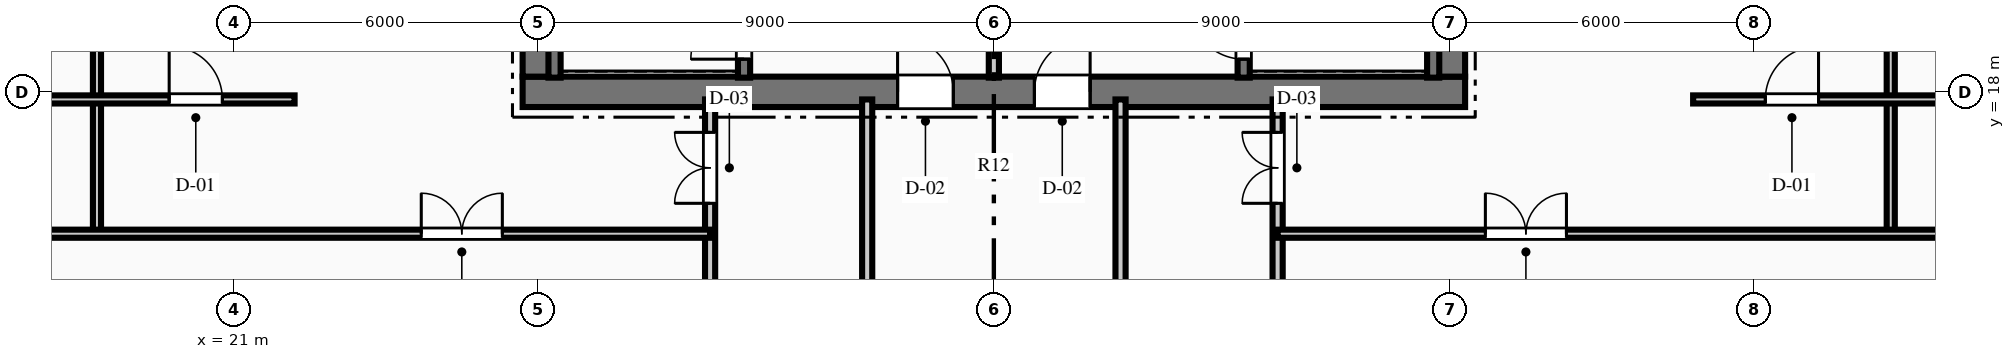
"""IFC4 building model, lengths in metres.
Left out: names, types, materials, properties, quantities, classifications, styles, units other than length and angle.
Written with IfcOpenShell. Run it as: python <this file> out.ifc"""

import sys

from ifc_helpers import new_model, si_unit, direction, frame, frame_2d, origin, place, context, subcontext, project, spatial, rectangle, extrude, element, fill, save


model = new_model("IFC4")
c1 = context("Model", 3, precision=1e-05, world=origin(), true_north=direction((0.0, 1.0)))
c2 = subcontext(c1, "Body", "Model", "MODEL_VIEW")
j1 = project(units=[si_unit("LENGTHUNIT", "METRE"), si_unit("PLANEANGLEUNIT", "RADIAN")], contexts=[c1])
p1 = place(None, origin())
s1 = spatial("IfcSite", under=j1, at=p1, CompositionType="ELEMENT")
p2 = place(p1, origin())
s2 = spatial("IfcBuilding", under=s1, at=p2, CompositionType="ELEMENT")
p3 = place(p2, origin())
s3 = spatial("IfcBuildingStorey", under=s2, at=p3, CompositionType="ELEMENT", Elevation=0.0)
p4 = place(p3, frame((26.7, 18.0, 0.0), z_axis=(0.0, 0.0, 1.0), x_axis=(1.0, 0.0, 0.0)))
e1 = element("IfcWall", 1, at=p4, inside=s3, PredefinedType="SHEAR", context=c2, shape_type="SweptSolid", body=[
    extrude(rectangle(XDim=18.6, YDim=0.6, at=frame_2d((9.3, 0.0))), origin(), (0.0, 0.0, 1.0), 6.0),
])
p5 = place(p4, frame((7.4, 0.0, 0.0)))
e2 = element("IfcOpeningElement", 2, at=p5, cuts=e1, PredefinedType="OPENING", context=c2, shape_type="SweptSolid", body=[
    extrude(rectangle(XDim=1.1, YDim=2.15, at=frame_2d((0.55, 1.075))), frame((0.0, 0.31, 0.0), z_axis=(0.0, -1.0, 0.0), x_axis=(1.0, 0.0, 0.0)), (0.0, 0.0, 1.0), 0.62),
])
p6 = place(p4, frame((10.1, 0.0, 0.0)))
e3 = element("IfcOpeningElement", 3, at=p6, cuts=e1, PredefinedType="OPENING", context=c2, shape_type="SweptSolid", body=[
    extrude(rectangle(XDim=1.1, YDim=2.15, at=frame_2d((0.55, 1.075))), frame((0.0, 0.31, 0.0), z_axis=(0.0, -1.0, 0.0), x_axis=(1.0, 0.0, 0.0)), (0.0, 0.0, 1.0), 0.62),
])
p7 = place(p3, frame((27.0, 18.3, 0.0), z_axis=(0.0, 0.0, 1.0), x_axis=(0.0, 1.0, 0.0)))
e4 = element("IfcWall", 4, at=p7, inside=s3, PredefinedType="SHEAR", context=c2, shape_type="SweptSolid", body=[
    extrude(rectangle(XDim=15.4, YDim=0.6, at=frame_2d((7.7, 0.0))), origin(), (0.0, 0.0, 1.0), 6.0),
])
p8 = place(p7, frame((9.94, 0.0, 0.0)))
e5 = element("IfcOpeningElement", 5, at=p8, cuts=e4, PredefinedType="OPENING", context=c2, shape_type="SweptSolid", body=[
    extrude(rectangle(XDim=1.4, YDim=2.2, at=frame_2d((0.7, 1.1))), frame((0.0, 0.31, 0.0), z_axis=(0.0, -1.0, 0.0), x_axis=(1.0, 0.0, 0.0)), (0.0, 0.0, 1.0), 0.62),
])
p9 = place(p3, frame((45.0, 18.3, 0.0), z_axis=(0.0, 0.0, 1.0), x_axis=(0.0, 1.0, 0.0)))
e6 = element("IfcWall", 6, at=p9, inside=s3, PredefinedType="SHEAR", context=c2, shape_type="SweptSolid", body=[
    extrude(rectangle(XDim=15.4, YDim=0.6, at=frame_2d((7.7, 0.0))), origin(), (0.0, 0.0, 1.0), 6.0),
])
p10 = place(p9, frame((9.94, 0.0, 0.0)))
e7 = element("IfcOpeningElement", 7, at=p10, cuts=e6, PredefinedType="OPENING", context=c2, shape_type="SweptSolid", body=[
    extrude(rectangle(XDim=1.4, YDim=2.2, at=frame_2d((0.7, 1.1))), frame((0.0, 0.31, 0.0), z_axis=(0.0, -1.0, 0.0), x_axis=(1.0, 0.0, 0.0)), (0.0, 0.0, 1.0), 0.62),
])
p11 = place(p3, frame((31.07, 18.28, 0.0), z_axis=(0.0, 0.0, 1.0), x_axis=(0.0, 1.0, 0.0)))
e8 = element("IfcWall", 8, at=p11, inside=s3, PredefinedType="SHEAR", context=c2, shape_type="SweptSolid", body=[
    extrude(rectangle(XDim=8.26, YDim=0.24, at=frame_2d((4.13, 0.0))), origin(), (0.0, 0.0, 1.0), 6.0),
])
p12 = place(p11, frame((0.365, 0.0, 0.0)))
e9 = element("IfcOpeningElement", 9, at=p12, cuts=e8, PredefinedType="OPENING", context=c2, shape_type="SweptSolid", body=[
    extrude(rectangle(XDim=1.05, YDim=2.15, at=frame_2d((0.525, 1.075))), frame((0.0, 0.13, 0.0), z_axis=(0.0, -1.0, 0.0), x_axis=(1.0, 0.0, 0.0)), (0.0, 0.0, 1.0), 0.26),
])
p13 = place(p3, frame((27.33, 18.28, 0.0), z_axis=(0.0, 0.0, 1.0), x_axis=(0.0, 1.0, 0.0)))
e10 = element("IfcWall", 10, at=p13, inside=s3, PredefinedType="SHEAR", context=c2, shape_type="SweptSolid", body=[
    extrude(rectangle(XDim=8.26, YDim=0.24, at=frame_2d((4.13, 0.0))), origin(), (0.0, 0.0, 1.0), 6.0),
])
p14 = place(p3, frame((40.93, 18.28, 0.0), z_axis=(0.0, 0.0, 1.0), x_axis=(0.0, 1.0, 0.0)))
e11 = element("IfcWall", 11, at=p14, inside=s3, PredefinedType="SHEAR", context=c2, shape_type="SweptSolid", body=[
    extrude(rectangle(XDim=8.26, YDim=0.24, at=frame_2d((4.13, 0.0))), origin(), (0.0, 0.0, 1.0), 6.0),
])
p15 = place(p14, frame((0.365, 0.0, 0.0)))
e12 = element("IfcOpeningElement", 12, at=p15, cuts=e11, PredefinedType="OPENING", context=c2, shape_type="SweptSolid", body=[
    extrude(rectangle(XDim=1.05, YDim=2.15, at=frame_2d((0.525, 1.075))), frame((0.0, 0.13, 0.0), z_axis=(0.0, -1.0, 0.0), x_axis=(1.0, 0.0, 0.0)), (0.0, 0.0, 1.0), 0.26),
])
p16 = place(p3, frame((44.67, 18.28, 0.0), z_axis=(0.0, 0.0, 1.0), x_axis=(0.0, 1.0, 0.0)))
e13 = element("IfcWall", 13, at=p16, inside=s3, PredefinedType="SHEAR", context=c2, shape_type="SweptSolid", body=[
    extrude(rectangle(XDim=8.26, YDim=0.24, at=frame_2d((4.13, 0.0))), origin(), (0.0, 0.0, 1.0), 6.0),
])
p17 = place(p3, frame((36.0, 18.28, 0.0), z_axis=(0.0, 0.0, 1.0), x_axis=(0.0, 1.0, 0.0)))
e14 = element("IfcWall", 14, at=p17, inside=s3, PredefinedType="PARTITIONING", context=c2, shape_type="SweptSolid", body=[
    extrude(rectangle(XDim=3.77, YDim=0.2, at=frame_2d((1.885, 0.0))), origin(), (0.0, 0.0, 1.0), 5.67),
])
p18 = place(p3, frame((30.4, 2.55, 0.0), z_axis=(0.0, 0.0, 1.0), x_axis=(0.0, 1.0, 0.0)))
e15 = element("IfcWall", 15, at=p18, inside=s3, PredefinedType="PARTITIONING", context=c2, shape_type="SweptSolid", body=[
    extrude(rectangle(XDim=15.3, YDim=0.2, at=frame_2d((7.65, 0.0))), origin(), (0.0, 0.0, 1.0), 5.67),
])
p19 = place(p18, frame((13.25, 0.0, 0.0)))
e16 = element("IfcOpeningElement", 16, at=p19, cuts=e15, PredefinedType="OPENING", context=c2, shape_type="SweptSolid", body=[
    extrude(rectangle(XDim=1.4, YDim=2.2, at=frame_2d((0.7, 1.1))), frame((0.0, 0.11, 0.0), z_axis=(0.0, -1.0, 0.0), x_axis=(1.0, 0.0, 0.0)), (0.0, 0.0, 1.0), 0.22),
])
for number, where, z_axis, x_axis in (
    (17, (33.5, 2.55, 0.0), (0.0, 0.0, 1.0), (0.0, 1.0, 0.0)),
    (18, (38.5, 2.55, 0.0), (0.0, 0.0, 1.0), (0.0, 1.0, 0.0)),
):
    element("IfcWall", number, at=place(p3, frame(where, z_axis=z_axis, x_axis=x_axis)), inside=s3, PredefinedType="PARTITIONING", context=c2, shape_type="SweptSolid", body=[
        extrude(rectangle(XDim=15.3, YDim=0.2, at=frame_2d((7.65, 0.0))), origin(), (0.0, 0.0, 1.0), 5.67),
    ])
p20 = place(p3, frame((41.6, 2.55, 0.0), z_axis=(0.0, 0.0, 1.0), x_axis=(0.0, 1.0, 0.0)))
e19 = element("IfcWall", 19, at=p20, inside=s3, PredefinedType="PARTITIONING", context=c2, shape_type="SweptSolid", body=[
    extrude(rectangle(XDim=15.3, YDim=0.2, at=frame_2d((7.65, 0.0))), origin(), (0.0, 0.0, 1.0), 5.67),
])
p21 = place(p20, frame((13.25, 0.0, 0.0)))
e20 = element("IfcOpeningElement", 20, at=p21, cuts=e19, PredefinedType="OPENING", context=c2, shape_type="SweptSolid", body=[
    extrude(rectangle(XDim=1.4, YDim=2.2, at=frame_2d((0.7, 1.1))), frame((0.0, 0.11, 0.0), z_axis=(0.0, -1.0, 0.0), x_axis=(1.0, 0.0, 0.0)), (0.0, 0.0, 1.0), 0.22),
])
for number, where, z_axis, x_axis in (
    (21, (18.3, 15.2, 0.0), (0.0, 0.0, 1.0), (0.0, 1.0, 0.0)),
    (22, (53.7, 15.2, 0.0), (0.0, 0.0, 1.0), (0.0, 1.0, 0.0)),
):
    element("IfcWall", number, at=place(p3, frame(where, z_axis=z_axis, x_axis=x_axis)), inside=s3, PredefinedType="PARTITIONING", context=c2, shape_type="SweptSolid", body=[
        extrude(rectangle(XDim=2.65, YDim=0.16, at=frame_2d((1.325, 0.0))), origin(), (0.0, 0.0, 1.0), 5.67),
    ])
p22 = place(p3, frame((18.3, 17.85, 0.0), z_axis=(0.0, 0.0, 1.0), x_axis=(0.0, 1.0, 0.0)))
e23 = element("IfcWall", 23, at=p22, inside=s3, PredefinedType="PARTITIONING", context=c2, shape_type="SweptSolid", body=[
    extrude(rectangle(XDim=3.97, YDim=0.16, at=frame_2d((1.985, 0.0))), origin(), (0.0, 0.0, 1.0), 5.67),
])
p23 = place(p22, frame((1.15, 0.0, 0.0)))
e24 = element("IfcOpeningElement", 24, at=p23, cuts=e23, PredefinedType="OPENING", context=c2, shape_type="SweptSolid", body=[
    extrude(rectangle(XDim=1.6, YDim=2.2, at=frame_2d((0.8, 1.1))), frame((0.0, 0.09, 0.0), z_axis=(0.0, -1.0, 0.0), x_axis=(1.0, 0.0, 0.0)), (0.0, 0.0, 1.0), 0.18),
])
p24 = place(p3, frame((9.85, 17.85, 0.0), z_axis=(0.0, 0.0, 1.0), x_axis=(1.0, 0.0, 0.0)))
e25 = element("IfcWall", 25, at=p24, inside=s3, PredefinedType="PARTITIONING", context=c2, shape_type="SweptSolid", body=[
    extrude(rectangle(XDim=12.35, YDim=0.16, at=frame_2d((6.175, 0.0))), origin(), (0.0, 0.0, 1.0), 4.803),
])
p25 = place(p24, frame((9.875, 0.0, 0.0)))
e26 = element("IfcOpeningElement", 26, at=p25, cuts=e25, PredefinedType="OPENING", context=c2, shape_type="SweptSolid", body=[
    extrude(rectangle(XDim=1.05, YDim=2.15, at=frame_2d((0.525, 1.075))), frame((0.0, 0.09, 0.0), z_axis=(0.0, -1.0, 0.0), x_axis=(1.0, 0.0, 0.0)), (0.0, 0.0, 1.0), 0.18),
])
p26 = place(p3, frame((53.7, 17.85, 0.0), z_axis=(0.0, 0.0, 1.0), x_axis=(0.0, 1.0, 0.0)))
e27 = element("IfcWall", 27, at=p26, inside=s3, PredefinedType="PARTITIONING", context=c2, shape_type="SweptSolid", body=[
    extrude(rectangle(XDim=3.97, YDim=0.16, at=frame_2d((1.985, 0.0))), origin(), (0.0, 0.0, 1.0), 5.67),
])
p27 = place(p26, frame((1.15, 0.0, 0.0)))
e28 = element("IfcOpeningElement", 28, at=p27, cuts=e27, PredefinedType="OPENING", context=c2, shape_type="SweptSolid", body=[
    extrude(rectangle(XDim=1.6, YDim=2.2, at=frame_2d((0.8, 1.1))), frame((0.0, 0.09, 0.0), z_axis=(0.0, -1.0, 0.0), x_axis=(1.0, 0.0, 0.0)), (0.0, 0.0, 1.0), 0.18),
])
p28 = place(p3, frame((49.8, 17.85, 0.0), z_axis=(0.0, 0.0, 1.0), x_axis=(1.0, 0.0, 0.0)))
e29 = element("IfcWall", 29, at=p28, inside=s3, PredefinedType="PARTITIONING", context=c2, shape_type="SweptSolid", body=[
    extrude(rectangle(XDim=12.35, YDim=0.16, at=frame_2d((6.175, 0.0))), origin(), (0.0, 0.0, 1.0), 4.803),
])
p29 = place(p28, frame((1.425, 0.0, 0.0)))
e30 = element("IfcOpeningElement", 30, at=p29, cuts=e29, PredefinedType="OPENING", context=c2, shape_type="SweptSolid", body=[
    extrude(rectangle(XDim=1.05, YDim=2.15, at=frame_2d((0.525, 1.075))), frame((0.0, 0.09, 0.0), z_axis=(0.0, -1.0, 0.0), x_axis=(1.0, 0.0, 0.0)), (0.0, 0.0, 1.0), 0.18),
])
p30 = place(p3, frame((8.1, 15.2, 0.0), z_axis=(0.0, 0.0, 1.0), x_axis=(1.0, 0.0, 0.0)))
e31 = element("IfcWall", 31, at=p30, inside=s3, PredefinedType="PARTITIONING", context=c2, shape_type="SweptSolid", body=[
    extrude(rectangle(XDim=22.3, YDim=0.16, at=frame_2d((11.15, 0.0))), origin(), (0.0, 0.0, 1.0), 4.803),
])
p31 = place(p30, frame((16.6, 0.0, 0.0)))
e32 = element("IfcOpeningElement", 32, at=p31, cuts=e31, PredefinedType="OPENING", context=c2, shape_type="SweptSolid", body=[
    extrude(rectangle(XDim=1.6, YDim=2.2, at=frame_2d((0.8, 1.1))), frame((0.0, 0.09, 0.0), z_axis=(0.0, -1.0, 0.0), x_axis=(1.0, 0.0, 0.0)), (0.0, 0.0, 1.0), 0.18),
])
p32 = place(p3, frame((41.6, 15.2, 0.0), z_axis=(0.0, 0.0, 1.0), x_axis=(1.0, 0.0, 0.0)))
e33 = element("IfcWall", 33, at=p32, inside=s3, PredefinedType="PARTITIONING", context=c2, shape_type="SweptSolid", body=[
    extrude(rectangle(XDim=22.3, YDim=0.16, at=frame_2d((11.15, 0.0))), origin(), (0.0, 0.0, 1.0), 4.803),
])
p33 = place(p32, frame((4.1, 0.0, 0.0)))
e34 = element("IfcOpeningElement", 34, at=p33, cuts=e33, PredefinedType="OPENING", context=c2, shape_type="SweptSolid", body=[
    extrude(rectangle(XDim=1.6, YDim=2.2, at=frame_2d((0.8, 1.1))), frame((0.0, 0.09, 0.0), z_axis=(0.0, -1.0, 0.0), x_axis=(1.0, 0.0, 0.0)), (0.0, 0.0, 1.0), 0.18),
])
p34 = place(p12, origin())
e35 = element("IfcDoor", 35, at=p34, inside=s3, OperationType="SINGLE_SWING_LEFT", PredefinedType="DOOR", context=c2, shape_type="SweptSolid", body=[
    extrude(rectangle(XDim=1.05, YDim=2.15, at=frame_2d((0.525, 1.075))), frame((0.0, 0.025, 0.0), z_axis=(0.0, -1.0, 0.0), x_axis=(1.0, 0.0, 0.0)), (0.0, 0.0, 1.0), 0.05),
])
fill(e9, e35)
p35 = place(p15, origin())
e36 = element("IfcDoor", 36, at=p35, inside=s3, OperationType="SINGLE_SWING_RIGHT", PredefinedType="DOOR", context=c2, shape_type="SweptSolid", body=[
    extrude(rectangle(XDim=1.05, YDim=2.15, at=frame_2d((0.525, 1.075))), frame((0.0, 0.025, 0.0), z_axis=(0.0, -1.0, 0.0), x_axis=(1.0, 0.0, 0.0)), (0.0, 0.0, 1.0), 0.05),
])
fill(e12, e36)
p36 = place(p5, origin())
e37 = element("IfcDoor", 37, at=p36, inside=s3, OperationType="SINGLE_SWING_LEFT", PredefinedType="DOOR", context=c2, shape_type="SweptSolid", body=[
    extrude(rectangle(XDim=1.1, YDim=2.15, at=frame_2d((0.55, 1.075))), frame((0.0, 0.025, 0.0), z_axis=(0.0, -1.0, 0.0), x_axis=(1.0, 0.0, 0.0)), (0.0, 0.0, 1.0), 0.05),
])
fill(e2, e37)
p37 = place(p6, origin())
e38 = element("IfcDoor", 38, at=p37, inside=s3, OperationType="SINGLE_SWING_RIGHT", PredefinedType="DOOR", context=c2, shape_type="SweptSolid", body=[
    extrude(rectangle(XDim=1.1, YDim=2.15, at=frame_2d((0.55, 1.075))), frame((0.0, 0.025, 0.0), z_axis=(0.0, -1.0, 0.0), x_axis=(1.0, 0.0, 0.0)), (0.0, 0.0, 1.0), 0.05),
])
fill(e3, e38)
p38 = place(p25, origin())
e39 = element("IfcDoor", 39, at=p38, inside=s3, OperationType="SINGLE_SWING_LEFT", PredefinedType="DOOR", context=c2, shape_type="SweptSolid", body=[
    extrude(rectangle(XDim=1.05, YDim=2.15, at=frame_2d((0.525, 1.075))), frame((0.0, 0.025, 0.0), z_axis=(0.0, -1.0, 0.0), x_axis=(1.0, 0.0, 0.0)), (0.0, 0.0, 1.0), 0.05),
])
fill(e26, e39)
p39 = place(p29, origin())
e40 = element("IfcDoor", 40, at=p39, inside=s3, OperationType="SINGLE_SWING_RIGHT", PredefinedType="DOOR", context=c2, shape_type="SweptSolid", body=[
    extrude(rectangle(XDim=1.05, YDim=2.15, at=frame_2d((0.525, 1.075))), frame((0.0, 0.025, 0.0), z_axis=(0.0, -1.0, 0.0), x_axis=(1.0, 0.0, 0.0)), (0.0, 0.0, 1.0), 0.05),
])
fill(e30, e40)
p40 = place(p19, origin())
e41 = element("IfcDoor", 41, at=p40, inside=s3, OperationType="DOUBLE_DOOR_SINGLE_SWING", PredefinedType="DOOR", context=c2, shape_type="SweptSolid", body=[
    extrude(rectangle(XDim=1.4, YDim=2.2, at=frame_2d((0.7, 1.1))), frame((0.0, 0.025, 0.0), z_axis=(0.0, -1.0, 0.0), x_axis=(1.0, 0.0, 0.0)), (0.0, 0.0, 1.0), 0.05),
])
fill(e16, e41)
p41 = place(p21, origin())
e42 = element("IfcDoor", 42, at=p41, inside=s3, OperationType="DOUBLE_DOOR_SINGLE_SWING", PredefinedType="DOOR", context=c2, shape_type="SweptSolid", body=[
    extrude(rectangle(XDim=1.4, YDim=2.2, at=frame_2d((0.7, 1.1))), frame((0.0, 0.025, 0.0), z_axis=(0.0, -1.0, 0.0), x_axis=(1.0, 0.0, 0.0)), (0.0, 0.0, 1.0), 0.05),
])
fill(e20, e42)
p42 = place(p31, origin())
e43 = element("IfcDoor", 43, at=p42, inside=s3, OperationType="DOUBLE_DOOR_SINGLE_SWING", PredefinedType="DOOR", context=c2, shape_type="SweptSolid", body=[
    extrude(rectangle(XDim=1.6, YDim=2.2, at=frame_2d((0.8, 1.1))), frame((0.0, 0.025, 0.0), z_axis=(0.0, -1.0, 0.0), x_axis=(1.0, 0.0, 0.0)), (0.0, 0.0, 1.0), 0.05),
])
fill(e32, e43)
p43 = place(p33, origin())
e44 = element("IfcDoor", 44, at=p43, inside=s3, OperationType="DOUBLE_DOOR_SINGLE_SWING", PredefinedType="DOOR", context=c2, shape_type="SweptSolid", body=[
    extrude(rectangle(XDim=1.6, YDim=2.2, at=frame_2d((0.8, 1.1))), frame((0.0, 0.025, 0.0), z_axis=(0.0, -1.0, 0.0), x_axis=(1.0, 0.0, 0.0)), (0.0, 0.0, 1.0), 0.05),
])
fill(e34, e44)
save(model, sys.argv[1])
